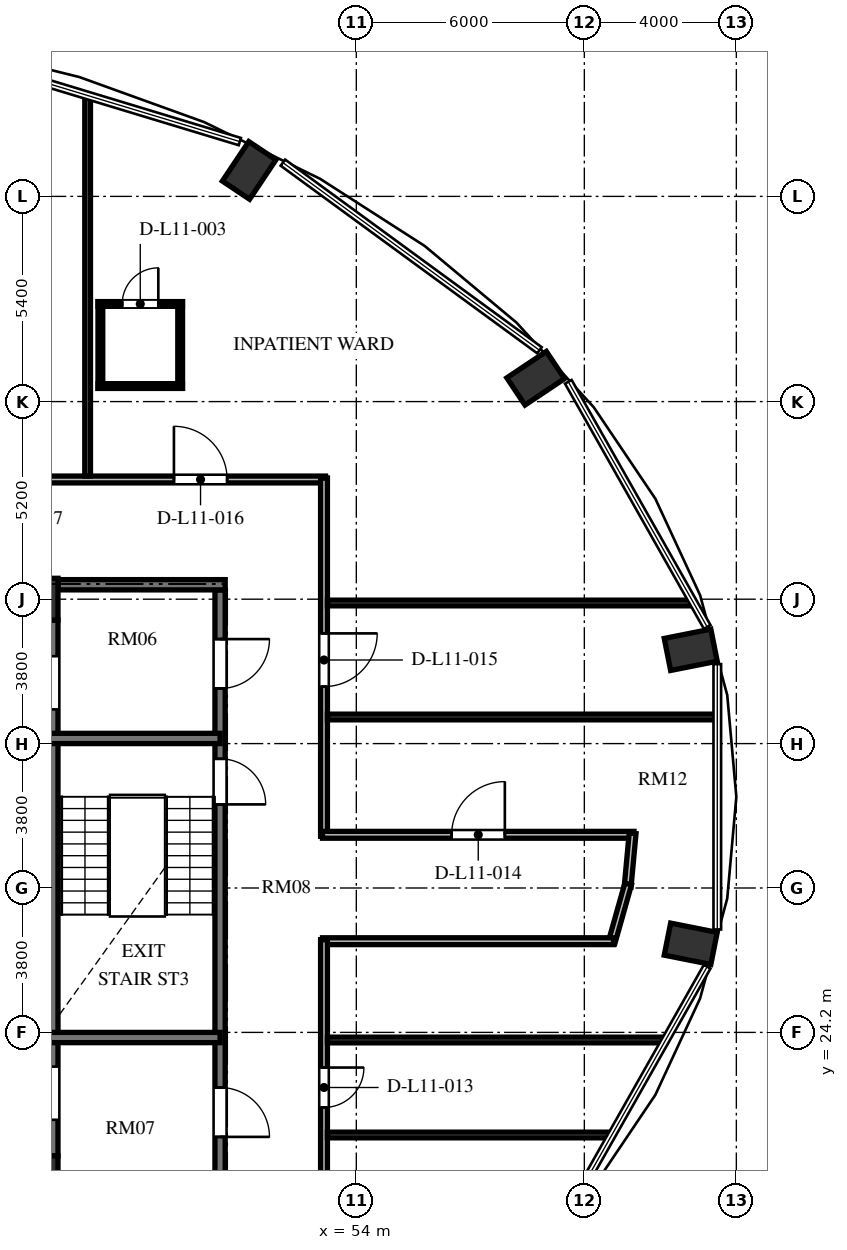
"""IFC4 building model, lengths in metres.
Left out: names, types, materials, properties, quantities, classifications, styles, units other than length and angle.
Written with IfcOpenShell. Run it as: python <this file> out.ifc"""

import sys

from ifc_helpers import new_model, si_unit, direction, frame, frame_2d, origin, origin_2d, place, context, subcontext, project, spatial, rectangle, extrude, element, fill, save


model = new_model("IFC4")
c1 = context("Model", 3, precision=1e-05, world=origin(), true_north=direction((0.0, 1.0)))
c2 = subcontext(c1, "Body", "Model", "MODEL_VIEW")
j1 = project(units=[si_unit("LENGTHUNIT", "METRE"), si_unit("PLANEANGLEUNIT", "RADIAN")], contexts=[c1])
p1 = place(None, origin())
s1 = spatial("IfcSite", under=j1, at=p1, CompositionType="ELEMENT")
p2 = place(p1, origin())
s2 = spatial("IfcBuilding", under=s1, at=p2, CompositionType="ELEMENT")
p3 = place(p2, frame((0.0, 0.0, 47.088)))
s3 = spatial("IfcBuildingStorey", under=s2, at=p3, CompositionType="ELEMENT", Elevation=47.088)
for number, where, z_axis, x_axis in (
    (1, (62.8, 26.532, 0.0), (0.0, 0.0, 1.0), (0.981, -0.195, 0.0)),
    (2, (62.8, 34.268, 0.0), (0.0, 0.0, 1.0), (0.981, 0.195, 0.0)),
    (3, (58.72, 41.414, 0.0), (0.0, 0.0, 1.0), (0.831, 0.556, 0.0)),
    (4, (51.181, 46.884, 0.0), (0.0, 0.0, 1.0), (0.556, 0.831, 0.0)),
):
    element("IfcColumn", number, at=place(p3, frame(where, z_axis=z_axis, x_axis=x_axis)), inside=s3, PredefinedType="COLUMN", context=c2, shape_type="SweptSolid", body=[
        extrude(rectangle(XDim=1.25, YDim=0.86, at=origin_2d()), origin(), (0.0, 0.0, 1.0), 3.648),
    ])
for number, where, z_axis, x_axis in (
    (5, (45.6, 20.4, 0.0), (0.0, 0.0, 1.0), (1.0, 0.0, 0.0)),
    (6, (45.6, 35.6, 0.0), (0.0, 0.0, 1.0), (1.0, 0.0, 0.0)),
):
    element("IfcColumn", number, at=place(p3, frame(where, z_axis=z_axis, x_axis=x_axis)), inside=s3, PredefinedType="COLUMN", context=c2, shape_type="SweptSolid", body=[
        extrude(rectangle(XDim=1.1, YDim=1.1, at=origin_2d()), origin(), (0.0, 0.0, 1.0), 3.648),
    ])
p4 = place(p3, frame((45.7, 20.95, 0.0), z_axis=(0.0, 0.0, 1.0), x_axis=(0.0, 1.0, 0.0)))
e7 = element("IfcWall", 7, at=p4, inside=s3, PredefinedType="SHEAR", context=c2, shape_type="SweptSolid", body=[
    extrude(rectangle(XDim=14.1, YDim=0.9, at=frame_2d((7.05, 0.0))), origin(), (0.0, 0.0, 1.0), 3.648),
])
p5 = place(p4, frame((11.75, 0.0, 0.0)))
e8 = element("IfcOpeningElement", 8, at=p5, cuts=e7, PredefinedType="OPENING", context=c2, shape_type="SweptSolid", body=[
    extrude(rectangle(XDim=1.4, YDim=2.3, at=frame_2d((0.7, 1.15))), frame((0.0, 0.46, 0.0), z_axis=(0.0, -1.0, 0.0), x_axis=(1.0, 0.0, 0.0)), (0.0, 0.0, 1.0), 0.92),
])
p6 = place(p4, frame((0.95, 0.0, 0.0)))
e9 = element("IfcOpeningElement", 9, at=p6, cuts=e7, PredefinedType="OPENING", context=c2, shape_type="SweptSolid", body=[
    extrude(rectangle(XDim=1.4, YDim=2.3, at=frame_2d((0.7, 1.15))), frame((0.0, 0.46, 0.0), z_axis=(0.0, -1.0, 0.0), x_axis=(1.0, 0.0, 0.0)), (0.0, 0.0, 1.0), 0.92),
])
p7 = place(p3, frame((50.415, 35.845, 0.0), z_axis=(0.0, 0.0, 1.0), x_axis=(0.0, -1.0, 0.0)))
e10 = element("IfcWall", 10, at=p7, inside=s3, PredefinedType="SHEAR", context=c2, shape_type="SweptSolid", body=[
    extrude(rectangle(XDim=15.825, YDim=0.27, at=frame_2d((7.913, 0.0))), origin(), (0.0, 0.0, 1.0), 3.648),
])
p8 = place(p7, frame((4.445, 0.0, 0.0)))
e11 = element("IfcOpeningElement", 11, at=p8, cuts=e10, PredefinedType="OPENING", context=c2, shape_type="SweptSolid", body=[
    extrude(rectangle(XDim=1.2, YDim=2.15, at=frame_2d((0.6, 1.075))), frame((0.0, 0.145, 0.0), z_axis=(0.0, -1.0, 0.0), x_axis=(1.0, 0.0, 0.0)), (0.0, 0.0, 1.0), 0.29),
])
p9 = place(p7, frame((1.295, 0.0, 0.0)))
e12 = element("IfcOpeningElement", 12, at=p9, cuts=e10, PredefinedType="OPENING", context=c2, shape_type="SweptSolid", body=[
    extrude(rectangle(XDim=1.3, YDim=2.2, at=frame_2d((0.65, 1.1))), frame((0.0, 0.145, 0.0), z_axis=(0.0, -1.0, 0.0), x_axis=(1.0, 0.0, 0.0)), (0.0, 0.0, 1.0), 0.29),
])
p10 = place(p7, frame((13.095, 0.0, 0.0)))
e13 = element("IfcOpeningElement", 13, at=p10, cuts=e10, PredefinedType="OPENING", context=c2, shape_type="SweptSolid", body=[
    extrude(rectangle(XDim=1.3, YDim=2.2, at=frame_2d((0.65, 1.1))), frame((0.0, 0.145, 0.0), z_axis=(0.0, -1.0, 0.0), x_axis=(1.0, 0.0, 0.0)), (0.0, 0.0, 1.0), 0.29),
])
p11 = place(p3, frame((46.15, 35.98, 0.0), z_axis=(0.0, 0.0, 1.0), x_axis=(1.0, 0.0, 0.0)))
e14 = element("IfcWall", 14, at=p11, inside=s3, PredefinedType="SHEAR", context=c2, shape_type="SweptSolid", body=[
    extrude(rectangle(XDim=4.4, YDim=0.27, at=frame_2d((2.2, 0.0))), origin(), (0.0, 0.0, 1.0), 3.648),
])
for number, where, z_axis, x_axis in (
    (15, (45.7, 31.935, 0.0), (0.0, 0.0, 1.0), (1.0, 0.0, 0.0)),
    (16, (45.7, 24.065, 0.0), (0.0, 0.0, 1.0), (1.0, 0.0, 0.0)),
):
    element("IfcWall", number, at=place(p3, frame(where, z_axis=z_axis, x_axis=x_axis)), inside=s3, PredefinedType="SHEAR", context=c2, shape_type="SweptSolid", body=[
        extrude(rectangle(XDim=4.715, YDim=0.27, at=frame_2d((2.357, 0.0))), origin(), (0.0, 0.0, 1.0), 3.648),
    ])
p12 = place(p3, frame((23.31, 38.75, 0.0), z_axis=(0.0, 0.0, 1.0), x_axis=(1.0, 0.0, 0.0)))
e17 = element("IfcWall", 17, at=p12, inside=s3, PredefinedType="PARTITIONING", context=c2, shape_type="SweptSolid", body=[
    extrude(rectangle(XDim=29.88, YDim=0.18, at=frame_2d((14.94, 0.0))), origin(), (0.0, 0.0, 1.0), 3.053),
])
p13 = place(p12, frame((25.891, 0.0, 0.0)))
e18 = element("IfcOpeningElement", 18, at=p13, cuts=e17, PredefinedType="OPENING", context=c2, shape_type="SweptSolid", body=[
    extrude(rectangle(XDim=1.4, YDim=2.2, at=frame_2d((0.7, 1.1))), frame((0.0, 0.1, 0.0), z_axis=(0.0, -1.0, 0.0), x_axis=(1.0, 0.0, 0.0)), (0.0, 0.0, 1.0), 0.2),
])
p14 = place(p12, frame((21.135, 0.0, 0.0)))
e19 = element("IfcOpeningElement", 19, at=p14, cuts=e17, PredefinedType="OPENING", context=c2, shape_type="SweptSolid", body=[
    extrude(rectangle(XDim=1.4, YDim=2.2, at=frame_2d((0.7, 1.1))), frame((0.0, 0.1, 0.0), z_axis=(0.0, -1.0, 0.0), x_axis=(1.0, 0.0, 0.0)), (0.0, 0.0, 1.0), 0.2),
])
p15 = place(p12, frame((17.565, 0.0, 0.0)))
e20 = element("IfcOpeningElement", 20, at=p15, cuts=e17, PredefinedType="OPENING", context=c2, shape_type="SweptSolid", body=[
    extrude(rectangle(XDim=1.4, YDim=2.2, at=frame_2d((0.7, 1.1))), frame((0.0, 0.1, 0.0), z_axis=(0.0, -1.0, 0.0), x_axis=(1.0, 0.0, 0.0)), (0.0, 0.0, 1.0), 0.2),
])
p16 = place(p12, frame((12.86, 0.0, 0.0)))
e21 = element("IfcOpeningElement", 21, at=p16, cuts=e17, PredefinedType="OPENING", context=c2, shape_type="SweptSolid", body=[
    extrude(rectangle(XDim=1.4, YDim=2.2, at=frame_2d((0.7, 1.1))), frame((0.0, 0.1, 0.0), z_axis=(0.0, -1.0, 0.0), x_axis=(1.0, 0.0, 0.0)), (0.0, 0.0, 1.0), 0.2),
])
p17 = place(p12, frame((11.11, 0.0, 0.0)))
e22 = element("IfcOpeningElement", 22, at=p17, cuts=e17, PredefinedType="OPENING", context=c2, shape_type="SweptSolid", body=[
    extrude(rectangle(XDim=0.95, YDim=2.1, at=frame_2d((0.475, 1.05))), frame((0.0, 0.1, 0.0), z_axis=(0.0, -1.0, 0.0), x_axis=(1.0, 0.0, 0.0)), (0.0, 0.0, 1.0), 0.2),
])
p18 = place(p12, frame((6.845, 0.0, 0.0)))
e23 = element("IfcOpeningElement", 23, at=p18, cuts=e17, PredefinedType="OPENING", context=c2, shape_type="SweptSolid", body=[
    extrude(rectangle(XDim=1.4, YDim=2.2, at=frame_2d((0.7, 1.1))), frame((0.0, 0.1, 0.0), z_axis=(0.0, -1.0, 0.0), x_axis=(1.0, 0.0, 0.0)), (0.0, 0.0, 1.0), 0.2),
])
p19 = place(p12, frame((2.339, 0.0, 0.0)))
e24 = element("IfcOpeningElement", 24, at=p19, cuts=e17, PredefinedType="OPENING", context=c2, shape_type="SweptSolid", body=[
    extrude(rectangle(XDim=1.4, YDim=2.2, at=frame_2d((0.7, 1.1))), frame((0.0, 0.1, 0.0), z_axis=(0.0, -1.0, 0.0), x_axis=(1.0, 0.0, 0.0)), (0.0, 0.0, 1.0), 0.2),
])
p20 = place(p3, frame((53.15, 38.79, 0.0), z_axis=(0.0, 0.0, 1.0), x_axis=(0.0, -1.0, 0.0)))
e25 = element("IfcWall", 25, at=p20, inside=s3, PredefinedType="PARTITIONING", context=c2, shape_type="SweptSolid", body=[
    extrude(rectangle(XDim=9.43, YDim=0.18, at=frame_2d((4.715, 0.0))), origin(), (0.0, 0.0, 1.0), 3.428),
])
p21 = place(p20, frame((4.09, 0.0, 0.0)))
e26 = element("IfcOpeningElement", 26, at=p21, cuts=e25, PredefinedType="OPENING", context=c2, shape_type="SweptSolid", body=[
    extrude(rectangle(XDim=1.4, YDim=2.2, at=frame_2d((0.7, 1.1))), frame((0.0, 0.1, 0.0), z_axis=(0.0, -1.0, 0.0), x_axis=(1.0, 0.0, 0.0)), (0.0, 0.0, 1.0), 0.2),
])
p22 = place(p3, frame((53.11, 29.4, 0.0), z_axis=(0.0, 0.0, 1.0), x_axis=(1.0, 0.0, 0.0)))
e27 = element("IfcWall", 27, at=p22, inside=s3, PredefinedType="PARTITIONING", context=c2, shape_type="SweptSolid", body=[
    extrude(rectangle(XDim=8.197, YDim=0.18, at=frame_2d((4.098, 0.0))), origin(), (0.0, 0.0, 1.0), 3.428),
])
p23 = place(p22, frame((3.398, 0.0, 0.0)))
e28 = element("IfcOpeningElement", 28, at=p23, cuts=e27, PredefinedType="OPENING", context=c2, shape_type="SweptSolid", body=[
    extrude(rectangle(XDim=1.4, YDim=2.2, at=frame_2d((0.7, 1.1))), frame((0.0, 0.1, 0.0), z_axis=(0.0, -1.0, 0.0), x_axis=(1.0, 0.0, 0.0)), (0.0, 0.0, 1.0), 0.2),
])
p24 = place(p3, frame((61.271, 29.44, 0.0), z_axis=(0.0, 0.0, 1.0), x_axis=(-0.092539930621, -0.995708974169, 0.0)))
e29 = element("IfcWall", 29, at=p24, inside=s3, PredefinedType="PARTITIONING", context=c2, shape_type="SweptSolid", body=[
    extrude(rectangle(XDim=1.417, YDim=0.18, at=frame_2d((0.708, 0.0))), origin(), (0.0, 0.0, 1.0), 3.428),
])
p25 = place(p3, frame((61.154, 28.107, 0.0), z_axis=(0.0, 0.0, 1.0), x_axis=(-0.271748942561, -0.962368179138, 0.0)))
e30 = element("IfcWall", 30, at=p25, inside=s3, PredefinedType="PARTITIONING", context=c2, shape_type="SweptSolid", body=[
    extrude(rectangle(XDim=1.606, YDim=0.18, at=frame_2d((0.803, 0.0))), origin(), (0.0, 0.0, 1.0), 3.428),
])
p26 = place(p3, frame((60.768, 26.6, 0.0), z_axis=(0.0, 0.0, 1.0), x_axis=(-1.0, 0.0, 0.0)))
e31 = element("IfcWall", 31, at=p26, inside=s3, PredefinedType="PARTITIONING", context=c2, shape_type="SweptSolid", body=[
    extrude(rectangle(XDim=7.658, YDim=0.18, at=frame_2d((3.829, 0.0))), origin(), (0.0, 0.0, 1.0), 3.428),
])
p27 = place(p3, frame((53.15, 26.64, 0.0), z_axis=(0.0, 0.0, 1.0), x_axis=(0.0, -1.0, 0.0)))
e32 = element("IfcWall", 32, at=p27, inside=s3, PredefinedType="PARTITIONING", context=c2, shape_type="SweptSolid", body=[
    extrude(rectangle(XDim=6.66, YDim=0.18, at=frame_2d((3.33, 0.0))), origin(), (0.0, 0.0, 1.0), 3.428),
])
p28 = place(p27, frame((3.365, 0.0, 0.0)))
e33 = element("IfcOpeningElement", 33, at=p28, cuts=e32, PredefinedType="OPENING", context=c2, shape_type="SweptSolid", body=[
    extrude(rectangle(XDim=1.05, YDim=2.15, at=frame_2d((0.525, 1.075))), frame((0.0, 0.1, 0.0), z_axis=(0.0, -1.0, 0.0), x_axis=(1.0, 0.0, 0.0)), (0.0, 0.0, 1.0), 0.2),
])
p29 = place(p3, frame((53.24, 21.5, 0.0), z_axis=(0.0, 0.0, 1.0), x_axis=(1.0, 0.0, 0.0)))
e34 = element("IfcWall", 34, at=p29, inside=s3, PredefinedType="PARTITIONING", context=c2, shape_type="SweptSolid", body=[
    extrude(rectangle(XDim=7.479, YDim=0.15, at=frame_2d((3.74, 0.0))), origin(), (0.0, 0.0, 1.0), 3.428),
])
p30 = place(p3, frame((53.24, 24.0, 0.0), z_axis=(0.0, 0.0, 1.0), x_axis=(1.0, 0.0, 0.0)))
e35 = element("IfcWall", 35, at=p30, inside=s3, PredefinedType="PARTITIONING", context=c2, shape_type="SweptSolid", body=[
    extrude(rectangle(XDim=8.895, YDim=0.15, at=frame_2d((4.448, 0.0))), origin(), (0.0, 0.0, 1.0), 3.428),
])
p31 = place(p3, frame((53.24, 32.5, 0.0), z_axis=(0.0, 0.0, 1.0), x_axis=(1.0, 0.0, 0.0)))
e36 = element("IfcWall", 36, at=p31, inside=s3, PredefinedType="PARTITIONING", context=c2, shape_type="SweptSolid", body=[
    extrude(rectangle(XDim=10.252, YDim=0.15, at=frame_2d((5.126, 0.0))), origin(), (0.0, 0.0, 1.0), 3.428),
])
p32 = place(p3, frame((53.24, 35.5, 0.0), z_axis=(0.0, 0.0, 1.0), x_axis=(1.0, 0.0, 0.0)))
e37 = element("IfcWall", 37, at=p32, inside=s3, PredefinedType="PARTITIONING", context=c2, shape_type="SweptSolid", body=[
    extrude(rectangle(XDim=9.632, YDim=0.15, at=frame_2d((4.816, 0.0))), origin(), (0.0, 0.0, 1.0), 3.428),
])
p33 = place(p3, frame((46.93, 38.84, 0.0), z_axis=(0.0, 0.0, 1.0), x_axis=(0.0, 1.0, 0.0)))
e38 = element("IfcWall", 38, at=p33, inside=s3, PredefinedType="PARTITIONING", context=c2, shape_type="SweptSolid", body=[
    extrude(rectangle(XDim=10.003, YDim=0.15, at=frame_2d((5.001, 0.0))), origin(), (0.0, 0.0, 1.0), 3.428),
])
p34 = place(p3, frame((47.205, 43.369, 0.0), z_axis=(0.0, 0.0, 1.0), x_axis=(1.0, 0.0, 0.0)))
e39 = element("IfcWall", 39, at=p34, inside=s3, PredefinedType="PARTITIONING", context=c2, shape_type="SweptSolid", body=[
    extrude(rectangle(XDim=2.22, YDim=0.125, at=frame_2d((1.11, 0.0))), origin(), (0.0, 0.0, 1.0), 3.428),
])
p35 = place(p34, frame((0.635, 0.0, 0.0)))
e40 = element("IfcOpeningElement", 40, at=p35, cuts=e39, PredefinedType="OPENING", context=c2, shape_type="SweptSolid", body=[
    extrude(rectangle(XDim=0.95, YDim=2.1, at=frame_2d((0.475, 1.05))), frame((0.0, 0.073, 0.0), z_axis=(0.0, -1.0, 0.0), x_axis=(1.0, 0.0, 0.0)), (0.0, 0.0, 1.0), 0.145),
])
p36 = place(p3, frame((47.205, 41.209, 0.0), z_axis=(0.0, 0.0, 1.0), x_axis=(1.0, 0.0, 0.0)))
e41 = element("IfcWall", 41, at=p36, inside=s3, PredefinedType="PARTITIONING", context=c2, shape_type="SweptSolid", body=[
    extrude(rectangle(XDim=2.22, YDim=0.125, at=frame_2d((1.11, 0.0))), origin(), (0.0, 0.0, 1.0), 3.428),
])
for number, where, z_axis, x_axis in (
    (42, (49.365, 41.149, 0.0), (0.0, 0.0, 1.0), (0.0, 1.0, 0.0)),
    (43, (47.265, 41.149, 0.0), (0.0, 0.0, 1.0), (0.0, 1.0, 0.0)),
):
    element("IfcWall", number, at=place(p3, frame(where, z_axis=z_axis, x_axis=x_axis)), inside=s3, PredefinedType="PARTITIONING", context=c2, shape_type="SweptSolid", body=[
        extrude(rectangle(XDim=2.28, YDim=0.125, at=frame_2d((1.14, 0.0))), origin(), (0.0, 0.0, 1.0), 3.428),
    ])
p37 = place(p8, origin())
e44 = element("IfcDoor", 44, at=p37, inside=s3, OperationType="SINGLE_SWING_RIGHT", PredefinedType="DOOR", context=c2, shape_type="SweptSolid", body=[
    extrude(rectangle(XDim=1.2, YDim=2.15, at=frame_2d((0.6, 1.075))), frame((0.0, 0.025, 0.0), z_axis=(0.0, -1.0, 0.0), x_axis=(1.0, 0.0, 0.0)), (0.0, 0.0, 1.0), 0.05),
])
fill(e11, e44)
p38 = place(p9, origin())
e45 = element("IfcDoor", 45, at=p38, inside=s3, OperationType="SINGLE_SWING_LEFT", PredefinedType="DOOR", context=c2, shape_type="SweptSolid", body=[
    extrude(rectangle(XDim=1.3, YDim=2.2, at=frame_2d((0.65, 1.1))), frame((0.0, 0.025, 0.0), z_axis=(0.0, -1.0, 0.0), x_axis=(1.0, 0.0, 0.0)), (0.0, 0.0, 1.0), 0.05),
])
fill(e12, e45)
p39 = place(p10, origin())
e46 = element("IfcDoor", 46, at=p39, inside=s3, OperationType="SINGLE_SWING_RIGHT", PredefinedType="DOOR", context=c2, shape_type="SweptSolid", body=[
    extrude(rectangle(XDim=1.3, YDim=2.2, at=frame_2d((0.65, 1.1))), frame((0.0, 0.025, 0.0), z_axis=(0.0, -1.0, 0.0), x_axis=(1.0, 0.0, 0.0)), (0.0, 0.0, 1.0), 0.05),
])
fill(e13, e46)
p40 = place(p28, origin())
e47 = element("IfcDoor", 47, at=p40, inside=s3, OperationType="SINGLE_SWING_LEFT", PredefinedType="DOOR", context=c2, shape_type="SweptSolid", body=[
    extrude(rectangle(XDim=1.05, YDim=2.15, at=frame_2d((0.525, 1.075))), frame((0.0, 0.025, 0.0), z_axis=(0.0, -1.0, 0.0), x_axis=(1.0, 0.0, 0.0)), (0.0, 0.0, 1.0), 0.05),
])
fill(e33, e47)
p41 = place(p23, origin())
e48 = element("IfcDoor", 48, at=p41, inside=s3, OperationType="SINGLE_SWING_RIGHT", PredefinedType="DOOR", context=c2, shape_type="SweptSolid", body=[
    extrude(rectangle(XDim=1.4, YDim=2.2, at=frame_2d((0.7, 1.1))), frame((0.0, 0.025, 0.0), z_axis=(0.0, -1.0, 0.0), x_axis=(1.0, 0.0, 0.0)), (0.0, 0.0, 1.0), 0.05),
])
fill(e28, e48)
p42 = place(p21, origin())
e49 = element("IfcDoor", 49, at=p42, inside=s3, OperationType="SINGLE_SWING_LEFT", PredefinedType="DOOR", context=c2, shape_type="SweptSolid", body=[
    extrude(rectangle(XDim=1.4, YDim=2.2, at=frame_2d((0.7, 1.1))), frame((0.0, 0.025, 0.0), z_axis=(0.0, -1.0, 0.0), x_axis=(1.0, 0.0, 0.0)), (0.0, 0.0, 1.0), 0.05),
])
fill(e26, e49)
p43 = place(p35, origin())
e50 = element("IfcDoor", 50, at=p43, inside=s3, OperationType="SINGLE_SWING_RIGHT", PredefinedType="DOOR", context=c2, shape_type="SweptSolid", body=[
    extrude(rectangle(XDim=0.95, YDim=2.1, at=frame_2d((0.475, 1.05))), frame((0.0, 0.025, 0.0), z_axis=(0.0, -1.0, 0.0), x_axis=(1.0, 0.0, 0.0)), (0.0, 0.0, 1.0), 0.05),
])
fill(e40, e50)
p44 = place(p13, origin())
e51 = element("IfcDoor", 51, at=p44, inside=s3, OperationType="SINGLE_SWING_LEFT", PredefinedType="DOOR", context=c2, shape_type="SweptSolid", body=[
    extrude(rectangle(XDim=1.4, YDim=2.2, at=frame_2d((0.7, 1.1))), frame((0.0, 0.025, 0.0), z_axis=(0.0, -1.0, 0.0), x_axis=(1.0, 0.0, 0.0)), (0.0, 0.0, 1.0), 0.05),
])
fill(e18, e51)
save(model, sys.argv[1])
